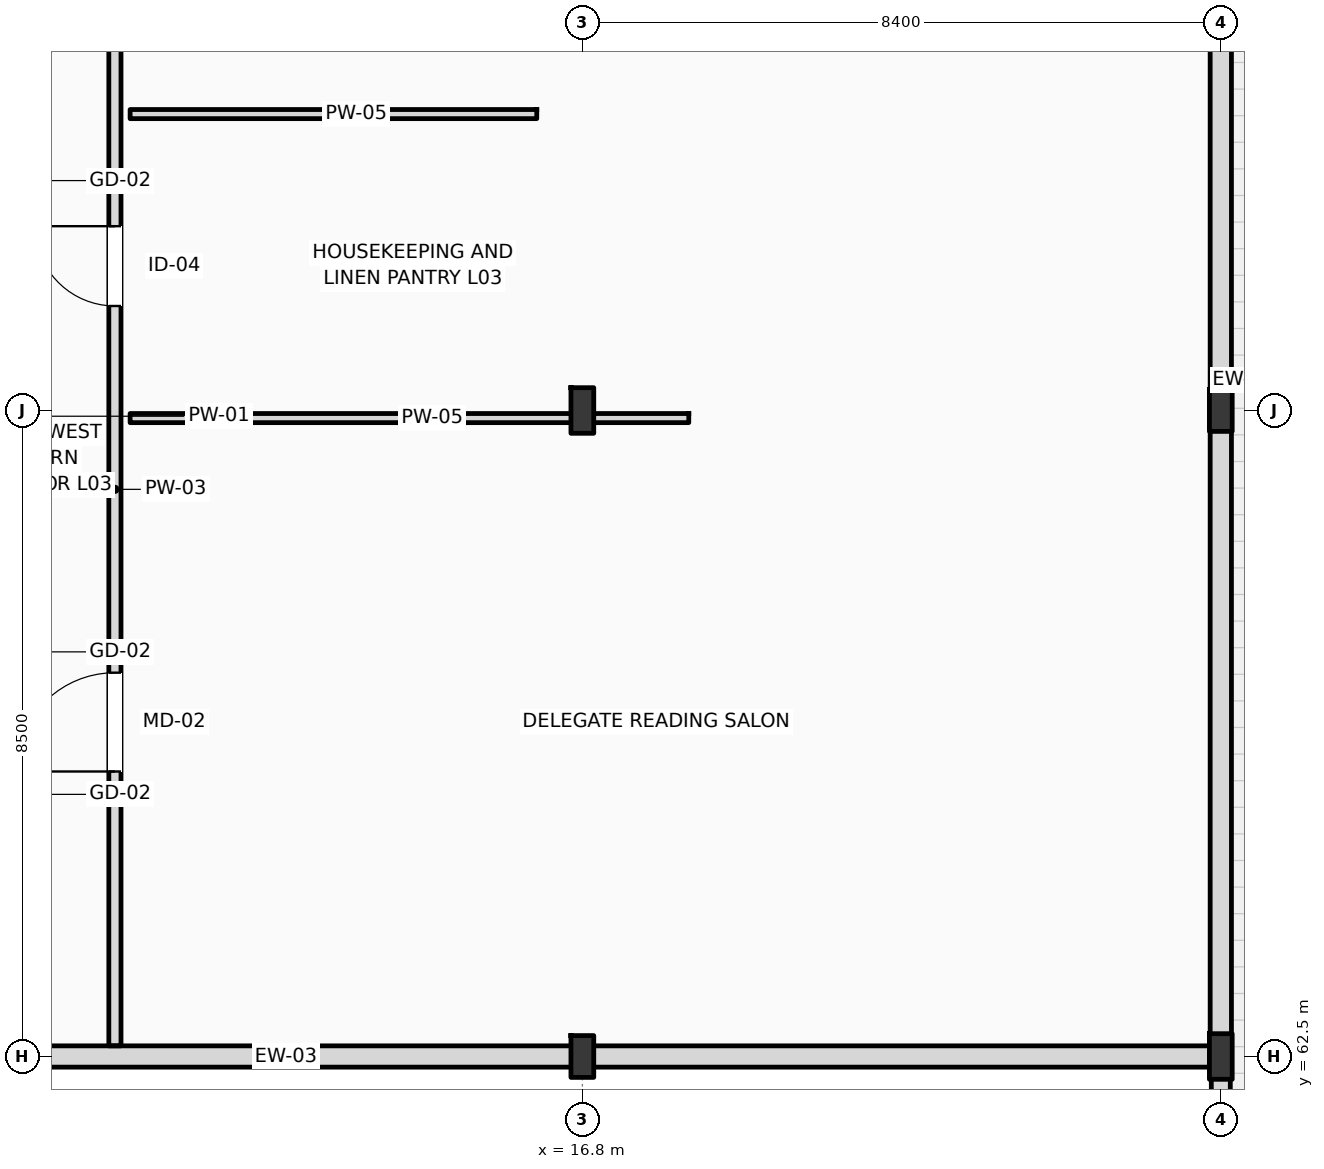
"""IFC4 building model, lengths in metres.
Left out: names, types, materials, properties, quantities, classifications, styles, units other than length and angle.
Written with IfcOpenShell. Run it as: python <this file> out.ifc"""

import sys

from ifc_helpers import new_model, si_unit, direction, frame, frame_2d, origin, origin_2d, place, context, subcontext, project, spatial, rectangle, i_section, extrude, element, fill, save


model = new_model("IFC4")
c1 = context("Model", 3, precision=1e-05, world=origin(), true_north=direction((0.0, 1.0)))
c2 = subcontext(c1, "Body", "Model", "MODEL_VIEW")
j1 = project(units=[si_unit("LENGTHUNIT", "METRE"), si_unit("PLANEANGLEUNIT", "RADIAN")], contexts=[c1])
p1 = place(None, origin())
s1 = spatial("IfcSite", under=j1, at=p1, CompositionType="ELEMENT")
p2 = place(p1, origin())
s2 = spatial("IfcBuilding", under=s1, at=p2, CompositionType="ELEMENT")
p3 = place(p2, frame((0.0, 0.0, 16.2)))
s3 = spatial("IfcBuildingStorey", under=s2, at=p3, CompositionType="ELEMENT", Elevation=16.2)
p4 = place(p3, frame((16.8, 62.5, 0.0), z_axis=(0.0, 0.0, 1.0), x_axis=(1.0, 0.0, 0.0)))
e1 = element("IfcColumn", 1, at=p4, inside=s3, PredefinedType="COLUMN", context=c2, shape_type="SweptSolid", body=[
    extrude(i_section(OverallWidth=0.3, OverallDepth=0.55, WebThickness=0.015, FlangeThickness=0.029, FilletRadius=0.027, at=origin_2d()), origin(), (0.0, 0.0, 1.0), 4.2),
])
for number, where, z_axis, x_axis in (
    (2, (16.8, 71.0, 0.0), (0.0, 0.0, 1.0), (1.0, 0.0, 0.0)),
    (3, (25.2, 62.5, 0.0), (0.0, 0.0, 1.0), (1.0, 0.0, 0.0)),
):
    element("IfcColumn", number, at=place(p3, frame(where, z_axis=z_axis, x_axis=x_axis)), inside=s3, PredefinedType="COLUMN", context=c2, shape_type="SweptSolid", body=[
        extrude(i_section(OverallWidth=0.3, OverallDepth=0.6, WebThickness=0.015, FlangeThickness=0.03, FilletRadius=0.027, at=origin_2d()), origin(), (0.0, 0.0, 1.0), 4.2),
    ])
p5 = place(p3, frame((25.2, 71.0, 0.0), z_axis=(0.0, 0.0, 1.0), x_axis=(1.0, 0.0, 0.0)))
e4 = element("IfcColumn", 4, at=p5, inside=s3, PredefinedType="COLUMN", context=c2, shape_type="SweptSolid", body=[
    extrude(i_section(OverallWidth=0.3, OverallDepth=0.55, WebThickness=0.015, FlangeThickness=0.029, FilletRadius=0.027, at=origin_2d()), origin(), (0.0, 0.0, 1.0), 4.2),
])
p6 = place(p3, frame((0.0, 62.5, 0.0), z_axis=(0.0, 0.0, 1.0), x_axis=(1.0, 0.0, 0.0)))
e5 = element("IfcWall", 5, at=p6, inside=s3, PredefinedType="STANDARD", context=c2, shape_type="SweptSolid", body=[
    extrude(rectangle(XDim=25.2, YDim=0.28, at=frame_2d((12.6, 0.0))), origin(), (0.0, 0.0, 1.0), 3.36),
])
p7 = place(p3, frame((25.2, 62.5, 0.0), z_axis=(0.0, 0.0, 1.0), x_axis=(0.0, 1.0, 0.0)))
e6 = element("IfcWall", 6, at=p7, inside=s3, PredefinedType="STANDARD", context=c2, shape_type="SweptSolid", body=[
    extrude(rectangle(XDim=17.0, YDim=0.28, at=frame_2d((8.5, 0.0))), origin(), (0.0, 0.0, 1.0), 3.51),
])
p8 = place(p3, frame((25.2, 54.0, 0.0), z_axis=(0.0, 0.0, 1.0), x_axis=(0.0, 1.0, 0.0)))
e7 = element("IfcWall", 7, at=p8, inside=s3, PredefinedType="PARAPET", context=c2, shape_type="SweptSolid", body=[
    extrude(rectangle(XDim=8.5, YDim=0.25, at=frame_2d((4.25, 0.0))), origin(), (0.0, 0.0, 1.0), 1.15),
])
p9 = place(p3, frame((10.65, 62.64, 0.0), z_axis=(0.0, 0.0, 1.0), x_axis=(0.0, 1.0, 0.0)))
e8 = element("IfcWall", 8, at=p9, inside=s3, PredefinedType="PARTITIONING", context=c2, shape_type="SweptSolid", body=[
    extrude(rectangle(XDim=16.31, YDim=0.16, at=frame_2d((8.155, 0.0))), origin(), (0.0, 0.0, 1.0), 3.92),
])
p10 = place(p9, frame((3.61, 0.0, 0.0)))
e9 = element("IfcOpeningElement", 9, at=p10, cuts=e8, PredefinedType="OPENING", context=c2, shape_type="SweptSolid", body=[
    extrude(rectangle(XDim=1.3, YDim=2.2, at=frame_2d((0.65, 1.1))), frame((0.0, 0.09, 0.0), z_axis=(0.0, -1.0, 0.0), x_axis=(1.0, 0.0, 0.0)), (0.0, 0.0, 1.0), 0.18),
])
p11 = place(p9, frame((9.735, 0.0, 0.0)))
e10 = element("IfcOpeningElement", 10, at=p11, cuts=e8, PredefinedType="OPENING", context=c2, shape_type="SweptSolid", body=[
    extrude(rectangle(XDim=1.05, YDim=2.12, at=frame_2d((0.525, 1.06))), frame((0.0, 0.09, 0.0), z_axis=(0.0, -1.0, 0.0), x_axis=(1.0, 0.0, 0.0)), (0.0, 0.0, 1.0), 0.18),
])
p12 = place(p9, frame((13.49, 0.0, 0.0)))
e11 = element("IfcOpeningElement", 11, at=p12, cuts=e8, PredefinedType="OPENING", context=c2, shape_type="SweptSolid", body=[
    extrude(rectangle(XDim=0.94, YDim=2.15, at=frame_2d((0.47, 1.075))), frame((0.0, 0.09, 0.0), z_axis=(0.0, -1.0, 0.0), x_axis=(1.0, 0.0, 0.0)), (0.0, 0.0, 1.0), 0.18),
])
p13 = place(p3, frame((10.85, 70.9, 0.0), z_axis=(0.0, 0.0, 1.0), x_axis=(1.0, 0.0, 0.0)))
e12 = element("IfcWall", 12, at=p13, inside=s3, PredefinedType="PARTITIONING", context=c2, shape_type="SweptSolid", body=[
    extrude(rectangle(XDim=7.35, YDim=0.12, at=frame_2d((3.675, 0.0))), origin(), (0.0, 0.0, 1.0), 3.36),
])
p14 = place(p3, frame((10.85, 74.9, 0.0), z_axis=(0.0, 0.0, 1.0), x_axis=(1.0, 0.0, 0.0)))
e13 = element("IfcWall", 13, at=p14, inside=s3, PredefinedType="PARTITIONING", context=c2, shape_type="SweptSolid", body=[
    extrude(rectangle(XDim=5.35, YDim=0.12, at=frame_2d((2.675, 0.0))), origin(), (0.0, 0.0, 1.0), 3.92),
])
p15 = place(p10, origin())
e14 = element("IfcDoor", 14, at=p15, inside=s3, OperationType="SINGLE_SWING_LEFT", PredefinedType="DOOR", context=c2, shape_type="SweptSolid", body=[
    extrude(rectangle(XDim=1.3, YDim=2.2, at=frame_2d((0.65, 1.1))), frame((0.0, 0.025, 0.0), z_axis=(0.0, -1.0, 0.0), x_axis=(1.0, 0.0, 0.0)), (0.0, 0.0, 1.0), 0.05),
])
fill(e9, e14)
p16 = place(p11, origin())
e15 = element("IfcDoor", 15, at=p16, inside=s3, OperationType="SINGLE_SWING_RIGHT", PredefinedType="DOOR", context=c2, shape_type="SweptSolid", body=[
    extrude(rectangle(XDim=1.05, YDim=2.12, at=frame_2d((0.525, 1.06))), frame((0.0, 0.025, 0.0), z_axis=(0.0, -1.0, 0.0), x_axis=(1.0, 0.0, 0.0)), (0.0, 0.0, 1.0), 0.05),
])
fill(e10, e15)
save(model, sys.argv[1])
